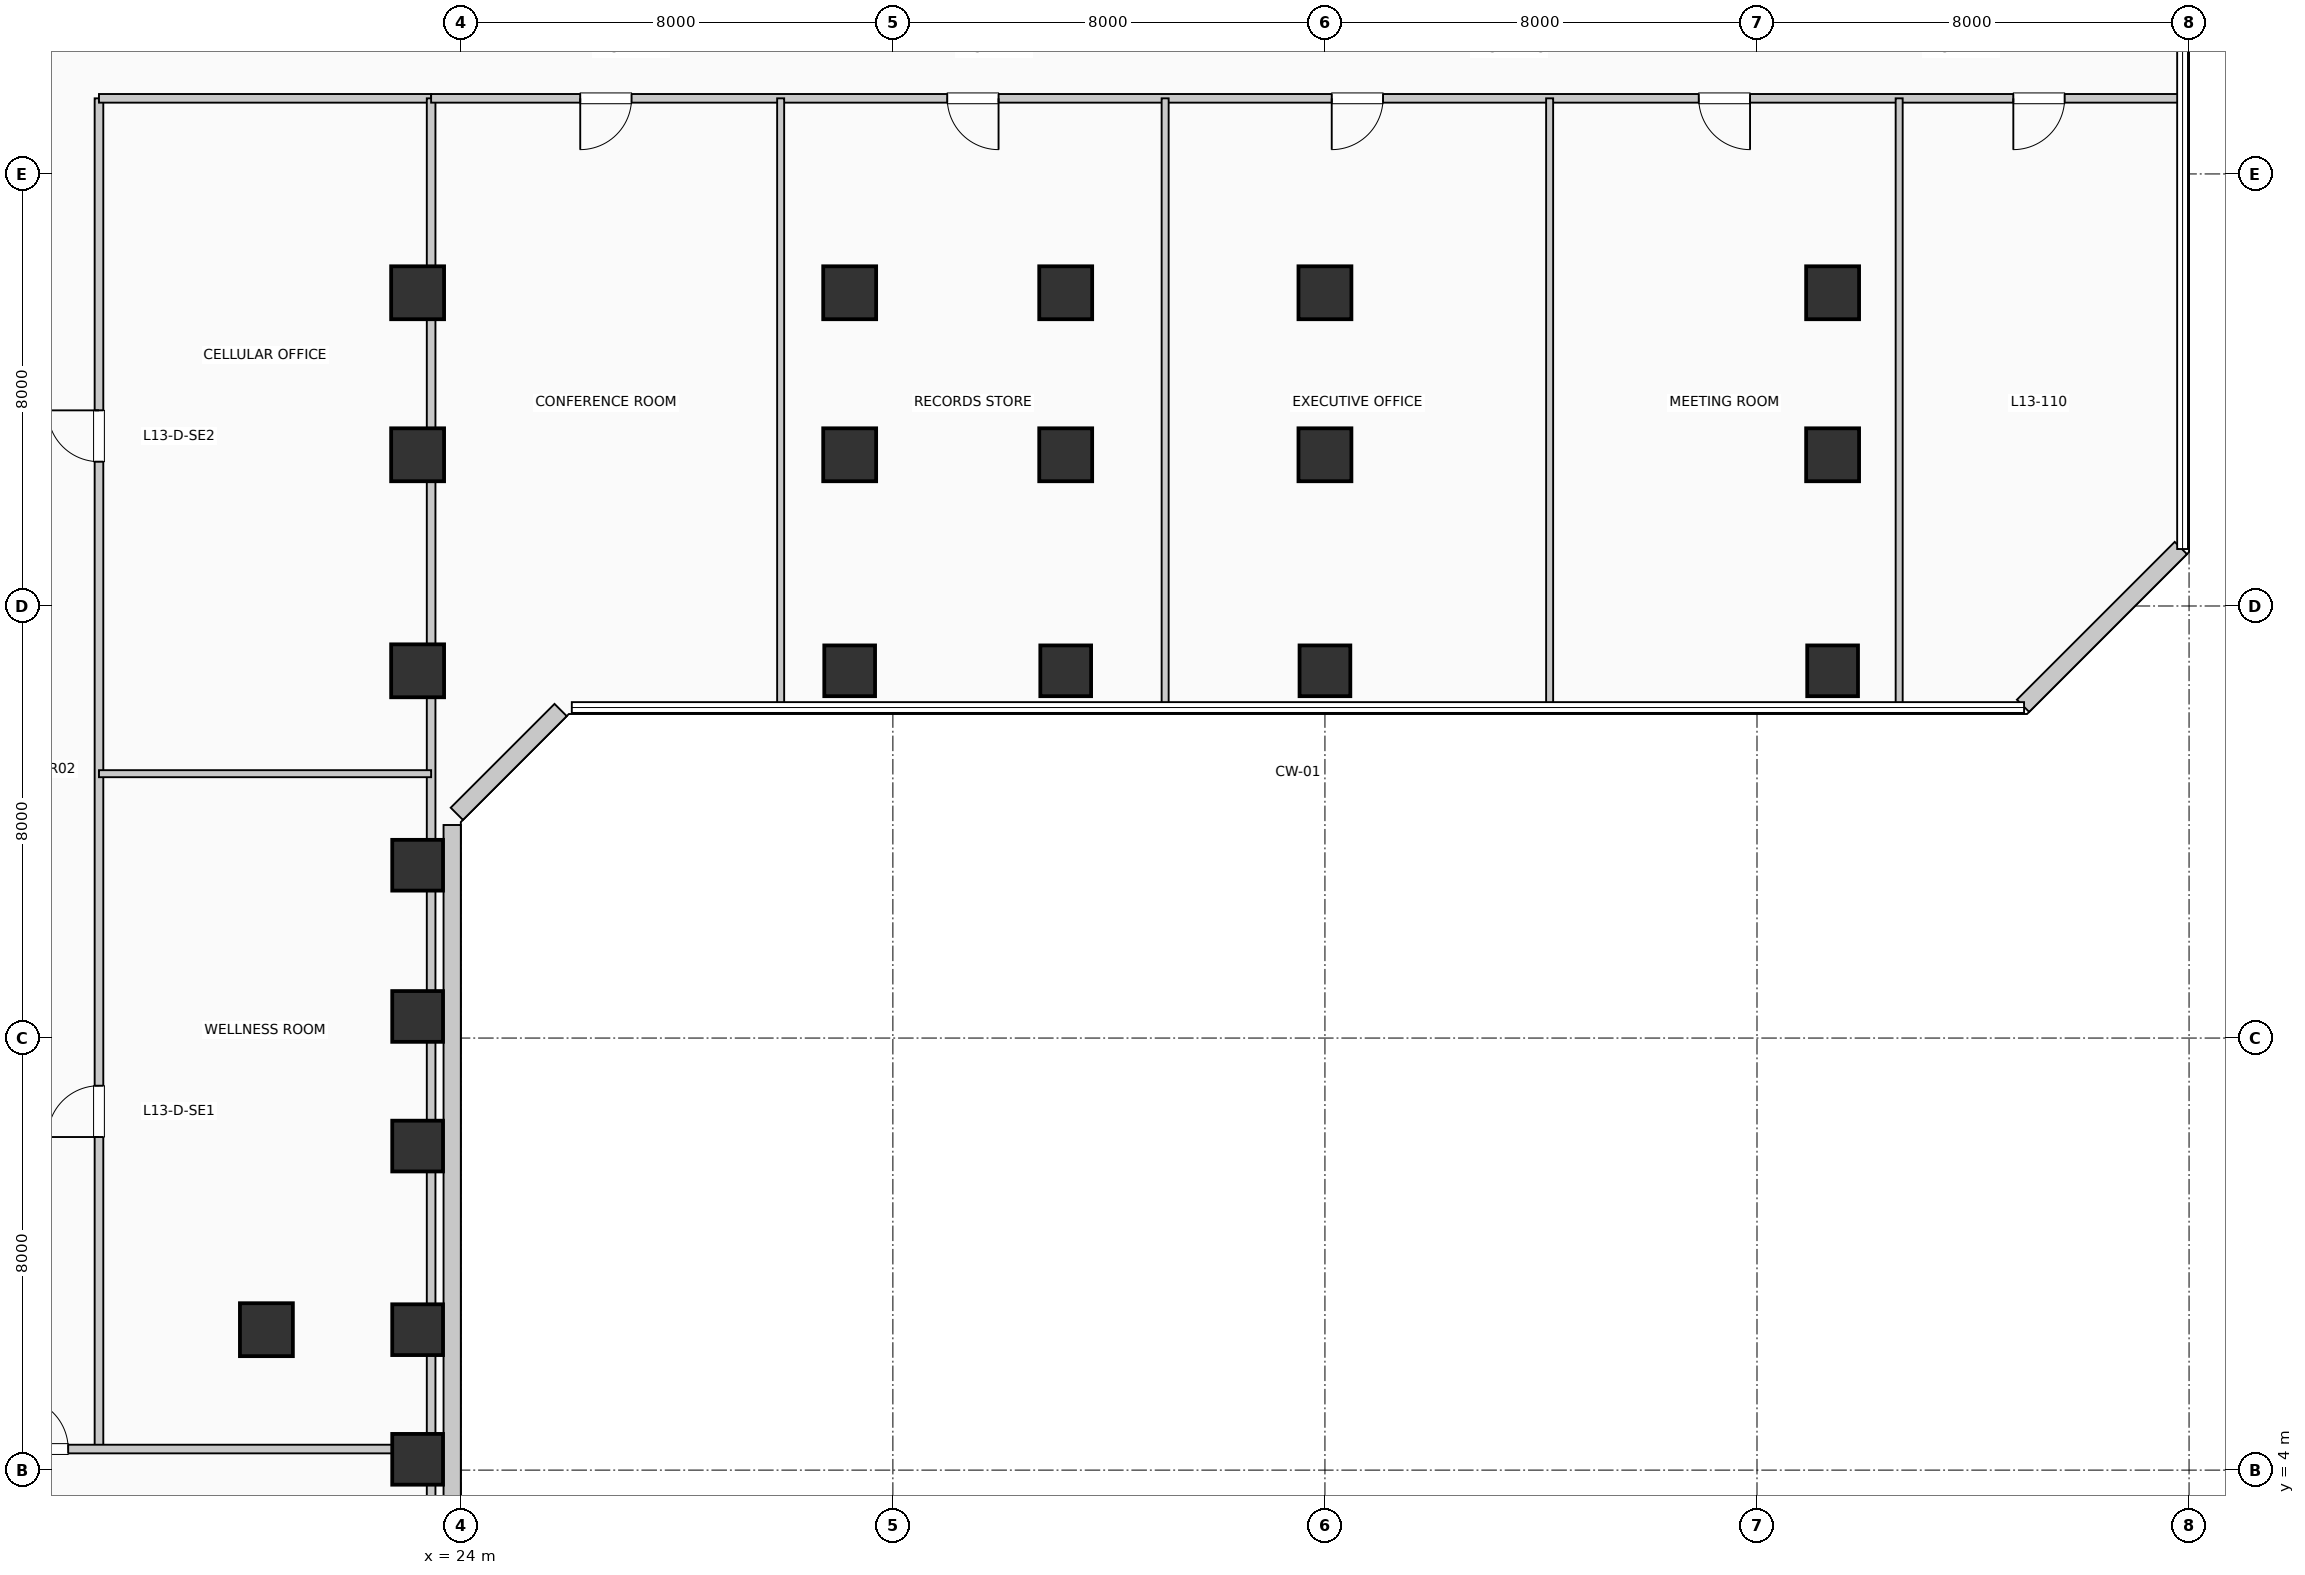
"""IFC4 building model, lengths in metres.
Left out: names, types, materials, properties, quantities, classifications, styles, units other than length and angle.
Written with IfcOpenShell. Run it as: python <this file> out.ifc"""

import sys

from ifc_helpers import new_model, si_unit, direction, frame, frame_2d, origin, origin_2d, place, context, subcontext, project, spatial, rectangle, extrude, element, fill, save


model = new_model("IFC4")
c1 = context("Model", 3, precision=1e-05, world=origin(), true_north=direction((0.0, 1.0)))
c2 = subcontext(c1, "Body", "Model", "MODEL_VIEW")
j1 = project(units=[si_unit("LENGTHUNIT", "METRE"), si_unit("PLANEANGLEUNIT", "RADIAN")], contexts=[c1])
p1 = place(None, origin())
s1 = spatial("IfcSite", under=j1, at=p1, CompositionType="ELEMENT")
p2 = place(p1, origin())
s2 = spatial("IfcBuilding", under=s1, at=p2, CompositionType="ELEMENT")
p3 = place(p2, frame((0.0, 0.0, 58.08)))
s3 = spatial("IfcBuildingStorey", under=s2, at=p3, CompositionType="ELEMENT", Elevation=58.08)
p4 = place(p3, frame((20.4, 6.6, 0.0), z_axis=(0.0, 0.0, 1.0), x_axis=(1.0, 0.0, 0.0)))
e1 = element("IfcColumn", 1, at=p4, inside=s3, PredefinedType="COLUMN", context=c2, shape_type="SweptSolid", body=[
    extrude(rectangle(XDim=0.98, YDim=0.98, at=origin_2d()), origin(), (0.0, 0.0, 1.0), 3.96),
])
for number, where, z_axis, x_axis in (
    (2, (23.2, 4.2, 0.0), (0.0, 0.0, 1.0), (1.0, 0.0, 0.0)),
    (3, (23.2, 6.6, 0.0), (0.0, 0.0, 1.0), (1.0, 0.0, 0.0)),
    (4, (23.2, 10.0, 0.0), (0.0, 0.0, 1.0), (1.0, 0.0, 0.0)),
    (5, (23.2, 12.4, 0.0), (0.0, 0.0, 1.0), (1.0, 0.0, 0.0)),
    (6, (23.2, 15.2, 0.0), (0.0, 0.0, 1.0), (1.0, 0.0, 0.0)),
):
    element("IfcColumn", number, at=place(p3, frame(where, z_axis=z_axis, x_axis=x_axis)), inside=s3, PredefinedType="COLUMN", context=c2, shape_type="SweptSolid", body=[
        extrude(rectangle(XDim=0.94, YDim=0.94, at=origin_2d()), origin(), (0.0, 0.0, 1.0), 3.96),
    ])
for number, where, z_axis, x_axis in (
    (7, (23.2, 18.8, 0.0), (0.0, 0.0, 1.0), (1.0, 0.0, 0.0)),
    (8, (23.2, 22.8, 0.0), (0.0, 0.0, 1.0), (1.0, 0.0, 0.0)),
    (9, (23.2, 25.8, 0.0), (0.0, 0.0, 1.0), (1.0, 0.0, 0.0)),
):
    element("IfcColumn", number, at=place(p3, frame(where, z_axis=z_axis, x_axis=x_axis)), inside=s3, PredefinedType="COLUMN", context=c2, shape_type="SweptSolid", body=[
        extrude(rectangle(XDim=0.98, YDim=0.98, at=origin_2d()), origin(), (0.0, 0.0, 1.0), 3.96),
    ])
p5 = place(p3, frame((31.2, 18.8, 0.0), z_axis=(0.0, 0.0, 1.0), x_axis=(1.0, 0.0, 0.0)))
e10 = element("IfcColumn", 10, at=p5, inside=s3, PredefinedType="COLUMN", context=c2, shape_type="SweptSolid", body=[
    extrude(rectangle(XDim=0.94, YDim=0.94, at=origin_2d()), origin(), (0.0, 0.0, 1.0), 3.96),
])
for number, where, z_axis, x_axis in (
    (11, (31.2, 22.8, 0.0), (0.0, 0.0, 1.0), (1.0, 0.0, 0.0)),
    (12, (31.2, 25.8, 0.0), (0.0, 0.0, 1.0), (1.0, 0.0, 0.0)),
):
    element("IfcColumn", number, at=place(p3, frame(where, z_axis=z_axis, x_axis=x_axis)), inside=s3, PredefinedType="COLUMN", context=c2, shape_type="SweptSolid", body=[
        extrude(rectangle(XDim=0.98, YDim=0.98, at=origin_2d()), origin(), (0.0, 0.0, 1.0), 3.96),
    ])
p6 = place(p3, frame((35.2, 18.8, 0.0), z_axis=(0.0, 0.0, 1.0), x_axis=(1.0, 0.0, 0.0)))
e13 = element("IfcColumn", 13, at=p6, inside=s3, PredefinedType="COLUMN", context=c2, shape_type="SweptSolid", body=[
    extrude(rectangle(XDim=0.94, YDim=0.94, at=origin_2d()), origin(), (0.0, 0.0, 1.0), 3.96),
])
for number, where, z_axis, x_axis in (
    (14, (35.2, 22.8, 0.0), (0.0, 0.0, 1.0), (1.0, 0.0, 0.0)),
    (15, (35.2, 25.8, 0.0), (0.0, 0.0, 1.0), (1.0, 0.0, 0.0)),
):
    element("IfcColumn", number, at=place(p3, frame(where, z_axis=z_axis, x_axis=x_axis)), inside=s3, PredefinedType="COLUMN", context=c2, shape_type="SweptSolid", body=[
        extrude(rectangle(XDim=0.98, YDim=0.98, at=origin_2d()), origin(), (0.0, 0.0, 1.0), 3.96),
    ])
p7 = place(p3, frame((40.0, 18.8, 0.0), z_axis=(0.0, 0.0, 1.0), x_axis=(1.0, 0.0, 0.0)))
e16 = element("IfcColumn", 16, at=p7, inside=s3, PredefinedType="COLUMN", context=c2, shape_type="SweptSolid", body=[
    extrude(rectangle(XDim=0.94, YDim=0.94, at=origin_2d()), origin(), (0.0, 0.0, 1.0), 3.96),
])
for number, where, z_axis, x_axis in (
    (17, (40.0, 22.8, 0.0), (0.0, 0.0, 1.0), (1.0, 0.0, 0.0)),
    (18, (40.0, 25.8, 0.0), (0.0, 0.0, 1.0), (1.0, 0.0, 0.0)),
):
    element("IfcColumn", number, at=place(p3, frame(where, z_axis=z_axis, x_axis=x_axis)), inside=s3, PredefinedType="COLUMN", context=c2, shape_type="SweptSolid", body=[
        extrude(rectangle(XDim=0.98, YDim=0.98, at=origin_2d()), origin(), (0.0, 0.0, 1.0), 3.96),
    ])
p8 = place(p3, frame((49.4, 18.8, 0.0), z_axis=(0.0, 0.0, 1.0), x_axis=(1.0, 0.0, 0.0)))
e19 = element("IfcColumn", 19, at=p8, inside=s3, PredefinedType="COLUMN", context=c2, shape_type="SweptSolid", body=[
    extrude(rectangle(XDim=0.94, YDim=0.94, at=origin_2d()), origin(), (0.0, 0.0, 1.0), 3.96),
])
for number, where, z_axis, x_axis in (
    (20, (49.4, 22.8, 0.0), (0.0, 0.0, 1.0), (1.0, 0.0, 0.0)),
    (21, (49.4, 25.8, 0.0), (0.0, 0.0, 1.0), (1.0, 0.0, 0.0)),
):
    element("IfcColumn", number, at=place(p3, frame(where, z_axis=z_axis, x_axis=x_axis)), inside=s3, PredefinedType="COLUMN", context=c2, shape_type="SweptSolid", body=[
        extrude(rectangle(XDim=0.98, YDim=0.98, at=origin_2d()), origin(), (0.0, 0.0, 1.0), 3.96),
    ])
p9 = place(p3, frame((23.84, 3.055, 0.0), z_axis=(0.0, 0.0, 1.0), x_axis=(0.0, 1.0, 0.0)))
e22 = element("IfcWall", 22, at=p9, inside=s3, PredefinedType="SOLIDWALL", context=c2, shape_type="SweptSolid", body=[
    extrude(rectangle(XDim=12.89, YDim=0.32, at=frame_2d((6.445, 0.0))), origin(), (0.0, 0.0, 1.0), 3.71),
])
p10 = place(p3, frame((23.926, 16.152, 0.0), z_axis=(0.0, 0.0, 1.0), x_axis=(0.707106781187, 0.707106781187, 0.0)))
e23 = element("IfcWall", 23, at=p10, inside=s3, PredefinedType="SOLIDWALL", context=c2, shape_type="SweptSolid", body=[
    extrude(rectangle(XDim=2.718, YDim=0.32, at=frame_2d((1.359, 0.0))), origin(), (0.0, 0.0, 1.0), 3.71),
])
p11 = place(p3, frame((52.926, 18.152, 0.0), z_axis=(0.0, 0.0, 1.0), x_axis=(0.707106781187, 0.707106781187, 0.0)))
e24 = element("IfcWall", 24, at=p11, inside=s3, PredefinedType="SOLIDWALL", context=c2, shape_type="SweptSolid", body=[
    extrude(rectangle(XDim=4.133, YDim=0.32, at=frame_2d((2.066, 0.0))), origin(), (0.0, 0.0, 1.0), 3.71),
])
p12 = place(p3, frame((17.3, 4.39, 0.0), z_axis=(0.0, 0.0, 1.0), x_axis=(0.0, 1.0, 0.0)))
e25 = element("IfcWall", 25, at=p12, inside=s3, PredefinedType="PARTITIONING", context=c2, shape_type="SweptSolid", body=[
    extrude(rectangle(XDim=25.01, YDim=0.16, at=frame_2d((12.505, 0.0))), origin(), (0.0, 0.0, 1.0), 3.71),
])
p13 = place(p12, frame((5.778, 0.0, 0.0)))
e26 = element("IfcOpeningElement", 26, at=p13, cuts=e25, PredefinedType="OPENING", context=c2, shape_type="SweptSolid", body=[
    extrude(rectangle(XDim=0.95, YDim=2.15, at=frame_2d((0.475, 1.075))), frame((0.0, 0.09, 0.0), z_axis=(0.0, -1.0, 0.0), x_axis=(1.0, 0.0, 0.0)), (0.0, 0.0, 1.0), 0.18),
])
p14 = place(p12, frame((18.282, 0.0, 0.0)))
e27 = element("IfcOpeningElement", 27, at=p14, cuts=e25, PredefinedType="OPENING", context=c2, shape_type="SweptSolid", body=[
    extrude(rectangle(XDim=0.95, YDim=2.15, at=frame_2d((0.475, 1.075))), frame((0.0, 0.09, 0.0), z_axis=(0.0, -1.0, 0.0), x_axis=(1.0, 0.0, 0.0)), (0.0, 0.0, 1.0), 0.18),
])
p15 = place(p3, frame((0.19, 4.39, 0.0), z_axis=(0.0, 0.0, 1.0), x_axis=(1.0, 0.0, 0.0)))
e28 = element("IfcWall", 28, at=p15, inside=s3, PredefinedType="PARTITIONING", context=c2, shape_type="SweptSolid", body=[
    extrude(rectangle(XDim=23.26, YDim=0.16, at=frame_2d((11.63, 0.0))), origin(), (0.0, 0.0, 1.0), 2.995),
])
p16 = place(p15, frame((15.59, 0.0, 0.0)))
e29 = element("IfcOpeningElement", 29, at=p16, cuts=e28, PredefinedType="OPENING", context=c2, shape_type="SweptSolid", body=[
    extrude(rectangle(XDim=0.95, YDim=2.15, at=frame_2d((0.475, 1.075))), frame((0.0, 0.09, 0.0), z_axis=(0.0, -1.0, 0.0), x_axis=(1.0, 0.0, 0.0)), (0.0, 0.0, 1.0), 0.18),
])
p17 = place(p3, frame((17.3, 29.4, 0.0), z_axis=(0.0, 0.0, 1.0), x_axis=(1.0, 0.0, 0.0)))
e30 = element("IfcWall", 30, at=p17, inside=s3, PredefinedType="PARTITIONING", context=c2, shape_type="SweptSolid", body=[
    extrude(rectangle(XDim=6.15, YDim=0.16, at=frame_2d((3.075, 0.0))), origin(), (0.0, 0.0, 1.0), 3.71),
])
p18 = place(p3, frame((23.45, 0.19, 0.0), z_axis=(0.0, 0.0, 1.0), x_axis=(0.0, 1.0, 0.0)))
e31 = element("IfcWall", 31, at=p18, inside=s3, PredefinedType="PARTITIONING", context=c2, shape_type="SweptSolid", body=[
    extrude(rectangle(XDim=29.21, YDim=0.16, at=frame_2d((14.605, 0.0))), origin(), (0.0, 0.0, 1.0), 2.995),
])
p19 = place(p3, frame((17.3, 16.895, 0.0), z_axis=(0.0, 0.0, 1.0), x_axis=(1.0, 0.0, 0.0)))
e32 = element("IfcWall", 32, at=p19, inside=s3, PredefinedType="PARTITIONING", context=c2, shape_type="SweptSolid", body=[
    extrude(rectangle(XDim=6.15, YDim=0.13, at=frame_2d((3.075, 0.0))), origin(), (0.0, 0.0, 1.0), 3.71),
])
p20 = place(p3, frame((23.45, 29.4, 0.0), z_axis=(0.0, 0.0, 1.0), x_axis=(1.0, 0.0, 0.0)))
e33 = element("IfcWall", 33, at=p20, inside=s3, PredefinedType="PARTITIONING", context=c2, shape_type="SweptSolid", body=[
    extrude(rectangle(XDim=32.36, YDim=0.16, at=frame_2d((16.18, 0.0))), origin(), (0.0, 0.0, 1.0), 3.365),
])
p21 = place(p20, frame((3.711, 0.0, 0.0), z_axis=(0.0, 0.0, 1.0), x_axis=(-1.0, 0.0, 0.0)))
e34 = element("IfcOpeningElement", 34, at=p21, cuts=e33, PredefinedType="OPENING", context=c2, shape_type="SweptSolid", body=[
    extrude(rectangle(XDim=0.95, YDim=2.15, at=frame_2d((0.475, 1.075))), frame((0.0, 0.09, 0.0), z_axis=(0.0, -1.0, 0.0), x_axis=(1.0, 0.0, 0.0)), (0.0, 0.0, 1.0), 0.18),
])
p22 = place(p20, frame((10.507, 0.0, 0.0), z_axis=(0.0, 0.0, 1.0), x_axis=(-1.0, 0.0, 0.0)))
e35 = element("IfcOpeningElement", 35, at=p22, cuts=e33, PredefinedType="OPENING", context=c2, shape_type="SweptSolid", body=[
    extrude(rectangle(XDim=0.95, YDim=2.15, at=frame_2d((0.475, 1.075))), frame((0.0, 0.09, 0.0), z_axis=(0.0, -1.0, 0.0), x_axis=(1.0, 0.0, 0.0)), (0.0, 0.0, 1.0), 0.18),
])
p23 = place(p20, frame((17.626, 0.0, 0.0), z_axis=(0.0, 0.0, 1.0), x_axis=(-1.0, 0.0, 0.0)))
e36 = element("IfcOpeningElement", 36, at=p23, cuts=e33, PredefinedType="OPENING", context=c2, shape_type="SweptSolid", body=[
    extrude(rectangle(XDim=0.95, YDim=2.15, at=frame_2d((0.475, 1.075))), frame((0.0, 0.09, 0.0), z_axis=(0.0, -1.0, 0.0), x_axis=(1.0, 0.0, 0.0)), (0.0, 0.0, 1.0), 0.18),
])
p24 = place(p20, frame((24.421, 0.0, 0.0), z_axis=(0.0, 0.0, 1.0), x_axis=(-1.0, 0.0, 0.0)))
e37 = element("IfcOpeningElement", 37, at=p24, cuts=e33, PredefinedType="OPENING", context=c2, shape_type="SweptSolid", body=[
    extrude(rectangle(XDim=0.95, YDim=2.15, at=frame_2d((0.475, 1.075))), frame((0.0, 0.09, 0.0), z_axis=(0.0, -1.0, 0.0), x_axis=(1.0, 0.0, 0.0)), (0.0, 0.0, 1.0), 0.18),
])
p25 = place(p20, frame((30.246, 0.0, 0.0), z_axis=(0.0, 0.0, 1.0), x_axis=(-1.0, 0.0, 0.0)))
e38 = element("IfcOpeningElement", 38, at=p25, cuts=e33, PredefinedType="OPENING", context=c2, shape_type="SweptSolid", body=[
    extrude(rectangle(XDim=0.95, YDim=2.15, at=frame_2d((0.475, 1.075))), frame((0.0, 0.09, 0.0), z_axis=(0.0, -1.0, 0.0), x_axis=(1.0, 0.0, 0.0)), (0.0, 0.0, 1.0), 0.18),
])
for number, where, z_axis, x_axis in (
    (39, (29.922, 18.19, 0.0), (0.0, 0.0, 1.0), (0.0, 1.0, 0.0)),
    (40, (37.041, 18.19, 0.0), (0.0, 0.0, 1.0), (0.0, 1.0, 0.0)),
    (41, (44.16, 18.19, 0.0), (0.0, 0.0, 1.0), (0.0, 1.0, 0.0)),
    (42, (50.632, 18.19, 0.0), (0.0, 0.0, 1.0), (0.0, 1.0, 0.0)),
):
    element("IfcWall", number, at=place(p3, frame(where, z_axis=z_axis, x_axis=x_axis)), inside=s3, PredefinedType="PARTITIONING", context=c2, shape_type="SweptSolid", body=[
        extrude(rectangle(XDim=11.21, YDim=0.13, at=frame_2d((5.605, 0.0))), origin(), (0.0, 0.0, 1.0), 3.71),
    ])
p26 = place(p16, origin())
e43 = element("IfcDoor", 43, at=p26, inside=s3, OperationType="SINGLE_SWING_LEFT", PredefinedType="DOOR", context=c2, shape_type="SweptSolid", body=[
    extrude(rectangle(XDim=0.95, YDim=2.15, at=frame_2d((0.475, 1.075))), frame((0.0, 0.025, 0.0), z_axis=(0.0, -1.0, 0.0), x_axis=(1.0, 0.0, 0.0)), (0.0, 0.0, 1.0), 0.05),
])
fill(e29, e43)
p27 = place(p13, origin())
e44 = element("IfcDoor", 44, at=p27, inside=s3, OperationType="SINGLE_SWING_LEFT", PredefinedType="DOOR", context=c2, shape_type="SweptSolid", body=[
    extrude(rectangle(XDim=0.95, YDim=2.15, at=frame_2d((0.475, 1.075))), frame((0.0, 0.025, 0.0), z_axis=(0.0, -1.0, 0.0), x_axis=(1.0, 0.0, 0.0)), (0.0, 0.0, 1.0), 0.05),
])
fill(e26, e44)
p28 = place(p14, origin())
e45 = element("IfcDoor", 45, at=p28, inside=s3, OperationType="SINGLE_SWING_RIGHT", PredefinedType="DOOR", context=c2, shape_type="SweptSolid", body=[
    extrude(rectangle(XDim=0.95, YDim=2.15, at=frame_2d((0.475, 1.075))), frame((0.0, 0.025, 0.0), z_axis=(0.0, -1.0, 0.0), x_axis=(1.0, 0.0, 0.0)), (0.0, 0.0, 1.0), 0.05),
])
fill(e27, e45)
p29 = place(p21, origin())
e46 = element("IfcDoor", 46, at=p29, inside=s3, OperationType="SINGLE_SWING_LEFT", PredefinedType="DOOR", context=c2, shape_type="SweptSolid", body=[
    extrude(rectangle(XDim=0.95, YDim=2.15, at=frame_2d((0.475, 1.075))), frame((0.0, 0.025, 0.0), z_axis=(0.0, -1.0, 0.0), x_axis=(1.0, 0.0, 0.0)), (0.0, 0.0, 1.0), 0.05),
])
fill(e34, e46)
p30 = place(p22, origin())
e47 = element("IfcDoor", 47, at=p30, inside=s3, OperationType="SINGLE_SWING_RIGHT", PredefinedType="DOOR", context=c2, shape_type="SweptSolid", body=[
    extrude(rectangle(XDim=0.95, YDim=2.15, at=frame_2d((0.475, 1.075))), frame((0.0, 0.025, 0.0), z_axis=(0.0, -1.0, 0.0), x_axis=(1.0, 0.0, 0.0)), (0.0, 0.0, 1.0), 0.05),
])
fill(e35, e47)
p31 = place(p23, origin())
e48 = element("IfcDoor", 48, at=p31, inside=s3, OperationType="SINGLE_SWING_LEFT", PredefinedType="DOOR", context=c2, shape_type="SweptSolid", body=[
    extrude(rectangle(XDim=0.95, YDim=2.15, at=frame_2d((0.475, 1.075))), frame((0.0, 0.025, 0.0), z_axis=(0.0, -1.0, 0.0), x_axis=(1.0, 0.0, 0.0)), (0.0, 0.0, 1.0), 0.05),
])
fill(e36, e48)
p32 = place(p24, origin())
e49 = element("IfcDoor", 49, at=p32, inside=s3, OperationType="SINGLE_SWING_RIGHT", PredefinedType="DOOR", context=c2, shape_type="SweptSolid", body=[
    extrude(rectangle(XDim=0.95, YDim=2.15, at=frame_2d((0.475, 1.075))), frame((0.0, 0.025, 0.0), z_axis=(0.0, -1.0, 0.0), x_axis=(1.0, 0.0, 0.0)), (0.0, 0.0, 1.0), 0.05),
])
fill(e37, e49)
p33 = place(p25, origin())
e50 = element("IfcDoor", 50, at=p33, inside=s3, OperationType="SINGLE_SWING_LEFT", PredefinedType="DOOR", context=c2, shape_type="SweptSolid", body=[
    extrude(rectangle(XDim=0.95, YDim=2.15, at=frame_2d((0.475, 1.075))), frame((0.0, 0.025, 0.0), z_axis=(0.0, -1.0, 0.0), x_axis=(1.0, 0.0, 0.0)), (0.0, 0.0, 1.0), 0.05),
])
fill(e38, e50)
save(model, sys.argv[1])
